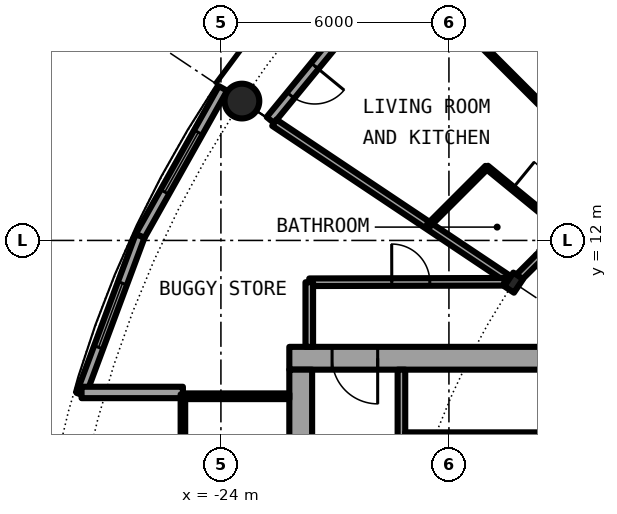
"""IFC4 building model, lengths in metres.
Left out: names, types, materials, properties, quantities, classifications, styles, units other than length and angle.
Written with IfcOpenShell. Run it as: python <this file> out.ifc"""

import sys

from ifc_helpers import new_model, si_unit, direction, frame, frame_2d, origin, origin_2d, place, context, subcontext, project, spatial, rectangle, hollow_circle, i_section, extrude, element, fill, save


model = new_model("IFC4")
c1 = context("Model", 3, precision=1e-05, world=origin(), true_north=direction((0.0, 1.0)))
c2 = subcontext(c1, "Body", "Model", "MODEL_VIEW")
j1 = project(units=[si_unit("LENGTHUNIT", "METRE"), si_unit("PLANEANGLEUNIT", "RADIAN")], contexts=[c1])
p1 = place(None, origin())
s1 = spatial("IfcSite", under=j1, at=p1, CompositionType="ELEMENT")
p2 = place(p1, origin())
s2 = spatial("IfcBuilding", under=s1, at=p2, CompositionType="ELEMENT")
p3 = place(p2, frame((0.0, 0.0, 111.65)))
s3 = spatial("IfcBuildingStorey", under=s2, at=p3, CompositionType="ELEMENT", Elevation=111.65)
p4 = place(p3, frame((-23.448, 15.667, 0.0), z_axis=(0.0, 0.0, 1.0), x_axis=(1.0, 0.0, 0.0)))
e1 = element("IfcColumn", 1, at=p4, inside=s3, PredefinedType="COLUMN", context=c2, shape_type="SweptSolid", body=[
    extrude(hollow_circle(Radius=0.457, WallThickness=0.04, at=origin_2d()), origin(), (0.0, 0.0, 1.0), 3.05),
])
p5 = place(p3, frame((-16.297, 10.889, 0.0), z_axis=(0.0, 0.0, 1.0), x_axis=(-0.831469612303, 0.55557023302, 0.0)))
e2 = element("IfcColumn", 2, at=p5, inside=s3, PredefinedType="COLUMN", context=c2, shape_type="SweptSolid", body=[
    extrude(i_section(OverallWidth=0.307, OverallDepth=0.432, WebThickness=0.021, FlangeThickness=0.04, FilletRadius=0.027, at=origin_2d()), origin(), (0.0, 0.0, 1.0), 3.05),
])
p6 = place(p3, frame((-19.304, 19.304, 0.0), z_axis=(0.0, 0.0, 1.0), x_axis=(-0.634382322723, -0.773019449054, 0.0)))
e3 = element("IfcWall", 3, at=p6, inside=s3, PredefinedType="SOLIDWALL", context=c2, shape_type="SweptSolid", body=[
    extrude(rectangle(XDim=5.352, YDim=0.25, at=frame_2d((2.676, 0.0))), origin(), (0.0, 0.0, 1.0), 2.7),
])
p7 = place(p6, frame((0.441, 0.0, 0.3)))
e4 = element("IfcOpeningElement", 4, at=p7, cuts=e3, PredefinedType="OPENING", context=c2, shape_type="SweptSolid", body=[
    extrude(rectangle(XDim=1.8, YDim=2.1, at=frame_2d((0.9, 1.05))), frame((0.0, 0.135, 0.0), z_axis=(0.0, -1.0, 0.0), x_axis=(1.0, 0.0, 0.0)), (0.0, 0.0, 1.0), 0.27),
])
p8 = place(p6, frame((3.51, 0.0, 0.0)))
e5 = element("IfcOpeningElement", 5, at=p8, cuts=e3, PredefinedType="OPENING", context=c2, shape_type="SweptSolid", body=[
    extrude(rectangle(XDim=1.0, YDim=2.2, at=frame_2d((0.5, 1.1))), frame((0.0, 0.135, 0.0), z_axis=(0.0, -1.0, 0.0), x_axis=(1.0, 0.0, 0.0)), (0.0, 0.0, 1.0), 0.27),
])
p9 = place(p3, frame((-23.946, 16.0, 0.0), z_axis=(0.0, 0.0, 1.0), x_axis=(-0.489696356642, -0.871893042919, 0.0)))
e6 = element("IfcWall", 6, at=p9, inside=s3, PredefinedType="SOLIDWALL", context=c2, shape_type="SweptSolid", body=[
    extrude(rectangle(XDim=4.454, YDim=0.25, at=frame_2d((2.227, 0.0))), origin(), (0.0, 0.0, 1.0), 2.7),
])
p10 = place(p9, frame((1.327, 0.0, 0.3)))
e7 = element("IfcOpeningElement", 7, at=p10, cuts=e6, PredefinedType="OPENING", context=c2, shape_type="SweptSolid", body=[
    extrude(rectangle(XDim=1.8, YDim=2.1, at=frame_2d((0.9, 1.05))), frame((0.0, 0.135, 0.0), z_axis=(0.0, -1.0, 0.0), x_axis=(1.0, 0.0, 0.0)), (0.0, 0.0, 1.0), 0.27),
])
p11 = place(p3, frame((-26.127, 12.117, 0.0), z_axis=(0.0, 0.0, 1.0), x_axis=(-0.349247811493, -0.937030397675, 0.0)))
e8 = element("IfcWall", 8, at=p11, inside=s3, PredefinedType="SOLIDWALL", context=c2, shape_type="SweptSolid", body=[
    extrude(rectangle(XDim=4.452, YDim=0.25, at=frame_2d((2.226, 0.0))), origin(), (0.0, 0.0, 1.0), 2.7),
])
p12 = place(p11, frame((1.327, 0.0, 0.3)))
e9 = element("IfcOpeningElement", 9, at=p12, cuts=e8, PredefinedType="OPENING", context=c2, shape_type="SweptSolid", body=[
    extrude(rectangle(XDim=1.8, YDim=2.1, at=frame_2d((0.9, 1.05))), frame((0.0, 0.135, 0.0), z_axis=(0.0, -1.0, 0.0), x_axis=(1.0, 0.0, 0.0)), (0.0, 0.0, 1.0), 0.27),
])
p13 = place(p3, frame((-25.0, 8.0, 0.0), z_axis=(0.0, 0.0, 1.0), x_axis=(-1.0, 0.0, 0.0)))
e10 = element("IfcWall", 10, at=p13, inside=s3, PredefinedType="SOLIDWALL", context=c2, shape_type="SweptSolid", body=[
    extrude(rectangle(XDim=2.667, YDim=0.3, at=frame_2d((1.333, 0.0))), origin(), (0.0, 0.0, 1.0), 2.7),
])
p14 = place(p3, frame((-8.4, 8.9, 0.0), z_axis=(0.0, 0.0, 1.0), x_axis=(-1.0, 0.0, 0.0)))
e11 = element("IfcWall", 11, at=p14, inside=s3, PredefinedType="SHEAR", context=c2, shape_type="SweptSolid", body=[
    extrude(rectangle(XDim=13.8, YDim=0.6, at=frame_2d((6.9, 0.0))), origin(), (0.0, 0.0, 1.0), 3.05),
])
p15 = place(p14, frame((11.475, 0.0, 0.0)))
e12 = element("IfcOpeningElement", 12, at=p15, cuts=e11, PredefinedType="OPENING", context=c2, shape_type="SweptSolid", body=[
    extrude(rectangle(XDim=1.2, YDim=2.3, at=frame_2d((0.6, 1.15))), frame((0.0, 0.31, 0.0), z_axis=(0.0, -1.0, 0.0), x_axis=(1.0, 0.0, 0.0)), (0.0, 0.0, 1.0), 0.62),
])
p16 = place(p3, frame((-21.9, -8.6, 0.0), z_axis=(0.0, 0.0, 1.0), x_axis=(0.0, 1.0, 0.0)))
e13 = element("IfcWall", 13, at=p16, inside=s3, PredefinedType="SHEAR", context=c2, shape_type="SweptSolid", body=[
    extrude(rectangle(XDim=17.2, YDim=0.6, at=frame_2d((8.6, 0.0))), origin(), (0.0, 0.0, 1.0), 3.05),
])
p17 = place(p16, frame((7.7, 0.0, 0.0)))
e14 = element("IfcOpeningElement", 14, at=p17, cuts=e13, PredefinedType="OPENING", context=c2, shape_type="SweptSolid", body=[
    extrude(rectangle(XDim=1.8, YDim=2.3, at=frame_2d((0.9, 1.15))), frame((0.0, 0.31, 0.0), z_axis=(0.0, -1.0, 0.0), x_axis=(1.0, 0.0, 0.0)), (0.0, 0.0, 1.0), 0.62),
])
p18 = place(p3, frame((-19.25, 8.6, 0.0), z_axis=(0.0, 0.0, 1.0), x_axis=(0.0, -1.0, 0.0)))
e15 = element("IfcWall", 15, at=p18, inside=s3, PredefinedType="SOLIDWALL", context=c2, shape_type="SweptSolid", body=[
    extrude(rectangle(XDim=7.025, YDim=0.2, at=frame_2d((3.513, 0.0))), origin(), (0.0, 0.0, 1.0), 2.7),
])
p19 = place(p18, frame((2.35, 0.0, 0.0)))
e16 = element("IfcOpeningElement", 16, at=p19, cuts=e15, PredefinedType="OPENING", context=c2, shape_type="SweptSolid", body=[
    extrude(rectangle(XDim=1.1, YDim=2.3, at=frame_2d((0.55, 1.15))), frame((0.0, 0.11, 0.0), z_axis=(0.0, -1.0, 0.0), x_axis=(1.0, 0.0, 0.0)), (0.0, 0.0, 1.0), 0.22),
])
p20 = place(p3, frame((-15.45, 6.875, 0.0), z_axis=(0.0, 0.0, 1.0), x_axis=(-1.0, 0.0, 0.0)))
e17 = element("IfcWall", 17, at=p20, inside=s3, PredefinedType="PARTITIONING", context=c2, shape_type="SweptSolid", body=[
    extrude(rectangle(XDim=3.7, YDim=0.15, at=frame_2d((1.85, 0.0))), origin(), (0.0, 0.0, 1.0), 2.7),
])
p21 = place(p20, frame((1.4, 0.0, 0.0)))
e18 = element("IfcOpeningElement", 18, at=p21, cuts=e17, PredefinedType="OPENING", context=c2, shape_type="SweptSolid", body=[
    extrude(rectangle(XDim=0.9, YDim=2.3, at=frame_2d((0.45, 1.15))), frame((0.0, 0.085, 0.0), z_axis=(0.0, -1.0, 0.0), x_axis=(1.0, 0.0, 0.0)), (0.0, 0.0, 1.0), 0.17),
])
p22 = place(p3, frame((-22.2, 7.9, 0.0), z_axis=(0.0, 0.0, 1.0), x_axis=(-1.0, 0.0, 0.0)))
e19 = element("IfcWall", 19, at=p22, inside=s3, PredefinedType="PARTITIONING", context=c2, shape_type="SweptSolid", body=[
    extrude(rectangle(XDim=2.74, YDim=0.15, at=frame_2d((1.37, 0.0))), origin(), (0.0, 0.0, 1.0), 2.7),
])
p23 = place(p3, frame((-25.0, 7.95, 0.0), z_axis=(0.0, 0.0, 1.0), x_axis=(0.0, -1.0, 0.0)))
e20 = element("IfcWall", 20, at=p23, inside=s3, PredefinedType="PARTITIONING", context=c2, shape_type="SweptSolid", body=[
    extrude(rectangle(XDim=15.9, YDim=0.12, at=frame_2d((7.95, 0.0))), origin(), (0.0, 0.0, 1.0), 2.7),
])
p24 = place(p23, frame((0.95, 0.0, 0.1)))
e21 = element("IfcOpeningElement", 21, at=p24, cuts=e20, PredefinedType="OPENING", context=c2, shape_type="SweptSolid", body=[
    extrude(rectangle(XDim=14.0, YDim=2.35, at=frame_2d((7.0, 1.175))), frame((0.0, 0.07, 0.0), z_axis=(0.0, -1.0, 0.0), x_axis=(1.0, 0.0, 0.0)), (0.0, 0.0, 1.0), 0.14),
])
p25 = place(p3, frame((-22.595, 15.098, 0.0), z_axis=(0.0, 0.0, 1.0), x_axis=(0.831406593008, -0.555664536482, 0.0)))
e22 = element("IfcWall", 22, at=p25, inside=s3, PredefinedType="PARTITIONING", context=c2, shape_type="SweptSolid", body=[
    extrude(rectangle(XDim=7.358, YDim=0.2, at=frame_2d((3.679, 0.0))), origin(), (0.0, 0.0, 1.0), 2.7),
])
p26 = place(p3, frame((-19.216, 19.216, 0.0), z_axis=(0.0, 0.0, 1.0), x_axis=(0.707106781187, -0.707106781187, 0.0)))
e23 = element("IfcWall", 23, at=p26, inside=s3, PredefinedType="PARTITIONING", context=c2, shape_type="SweptSolid", body=[
    extrude(rectangle(XDim=5.305, YDim=0.1, at=frame_2d((2.652, 0.0))), origin(), (0.0, 0.0, 1.0), 2.7),
])
p27 = place(p26, frame((2.202, 0.0, 0.0)))
e24 = element("IfcOpeningElement", 24, at=p27, cuts=e23, PredefinedType="OPENING", context=c2, shape_type="SweptSolid", body=[
    extrude(rectangle(XDim=0.9, YDim=2.3, at=frame_2d((0.45, 1.15))), frame((0.0, 0.06, 0.0), z_axis=(0.0, -1.0, 0.0), x_axis=(1.0, 0.0, 0.0)), (0.0, 0.0, 1.0), 0.12),
])
p28 = place(p3, frame((-17.004, 13.927, 0.0), z_axis=(0.0, 0.0, 1.0), x_axis=(0.77367517848, -0.633582447834, 0.0)))
e25 = element("IfcWall", 25, at=p28, inside=s3, PredefinedType="PARTITIONING", context=c2, shape_type="SweptSolid", body=[
    extrude(rectangle(XDim=2.661, YDim=0.1, at=frame_2d((1.331, 0.0))), origin(), (0.0, 0.0, 1.0), 2.7),
])
p29 = place(p28, frame((0.881, 0.0, 0.0)))
e26 = element("IfcOpeningElement", 26, at=p29, cuts=e25, PredefinedType="OPENING", context=c2, shape_type="SweptSolid", body=[
    extrude(rectangle(XDim=0.9, YDim=2.3, at=frame_2d((0.45, 1.15))), frame((0.0, 0.06, 0.0), z_axis=(0.0, -1.0, 0.0), x_axis=(1.0, 0.0, 0.0)), (0.0, 0.0, 1.0), 0.12),
])
p30 = place(p3, frame((-21.675, 10.9, 0.0), z_axis=(0.0, 0.0, 1.0), x_axis=(0.999997173357, 0.002377662213, 0.0)))
e27 = element("IfcWall", 27, at=p30, inside=s3, PredefinedType="PARTITIONING", context=c2, shape_type="SweptSolid", body=[
    extrude(rectangle(XDim=5.134, YDim=0.2, at=frame_2d((2.567, 0.0))), origin(), (0.0, 0.0, 1.0), 2.7),
])
p31 = place(p30, frame((2.171, 0.0, 0.0)))
e28 = element("IfcOpeningElement", 28, at=p31, cuts=e27, PredefinedType="OPENING", context=c2, shape_type="SweptSolid", body=[
    extrude(rectangle(XDim=1.0, YDim=2.3, at=frame_2d((0.5, 1.15))), frame((0.0, 0.11, 0.0), z_axis=(0.0, -1.0, 0.0), x_axis=(1.0, 0.0, 0.0)), (0.0, 0.0, 1.0), 0.22),
])
p32 = place(p3, frame((-16.186, 11.0, 0.0), z_axis=(0.0, 0.0, 1.0), x_axis=(0.707106781187, 0.707106781187, 0.0)))
e29 = element("IfcWall", 29, at=p32, inside=s3, PredefinedType="PARTITIONING", context=c2, shape_type="SweptSolid", body=[
    extrude(rectangle(XDim=7.334, YDim=0.2, at=frame_2d((3.667, 0.0))), origin(), (0.0, 0.0, 1.0), 2.39),
])
p33 = place(p32, frame((4.123, 0.0, 0.0)))
e30 = element("IfcOpeningElement", 30, at=p33, cuts=e29, PredefinedType="OPENING", context=c2, shape_type="SweptSolid", body=[
    extrude(rectangle(XDim=1.0, YDim=2.3, at=frame_2d((0.5, 1.15))), frame((0.0, 0.11, 0.0), z_axis=(0.0, -1.0, 0.0), x_axis=(1.0, 0.0, 0.0)), (0.0, 0.0, 1.0), 0.22),
])
p34 = place(p3, frame((-21.675, 9.2, 0.0), z_axis=(0.0, 0.0, 1.0), x_axis=(0.0, 1.0, 0.0)))
e31 = element("IfcWall", 31, at=p34, inside=s3, PredefinedType="PARTITIONING", context=c2, shape_type="SweptSolid", body=[
    extrude(rectangle(XDim=1.7, YDim=0.2, at=frame_2d((0.85, 0.0))), origin(), (0.0, 0.0, 1.0), 2.7),
])
p35 = place(p3, frame((-18.542, 12.389, 0.0), z_axis=(0.0, 0.0, 1.0), x_axis=(0.707106781187, 0.707106781187, 0.0)))
e32 = element("IfcWall", 32, at=p35, inside=s3, PredefinedType="PARTITIONING", context=c2, shape_type="SweptSolid", body=[
    extrude(rectangle(XDim=2.175, YDim=0.1, at=frame_2d((1.088, 0.0))), origin(), (0.0, 0.0, 1.0), 2.7),
])
p36 = place(p8, origin())
e33 = element("IfcDoor", 33, at=p36, inside=s3, OperationType="SINGLE_SWING_LEFT", PredefinedType="DOOR", context=c2, shape_type="SweptSolid", body=[
    extrude(rectangle(XDim=1.0, YDim=2.2, at=frame_2d((0.5, 1.1))), frame((0.0, 0.025, 0.0), z_axis=(0.0, -1.0, 0.0), x_axis=(1.0, 0.0, 0.0)), (0.0, 0.0, 1.0), 0.05),
])
fill(e5, e33)
p37 = place(p10, origin())
e34 = element("IfcWindow", 34, at=p37, inside=s3, PartitioningType="SINGLE_PANEL", PredefinedType="WINDOW", context=c2, shape_type="SweptSolid", body=[
    extrude(rectangle(XDim=1.8, YDim=2.1, at=frame_2d((0.9, 1.05))), frame((0.0, 0.03, 0.0), z_axis=(0.0, -1.0, 0.0), x_axis=(1.0, 0.0, 0.0)), (0.0, 0.0, 1.0), 0.06),
])
fill(e7, e34)
p38 = place(p12, origin())
e35 = element("IfcWindow", 35, at=p38, inside=s3, PartitioningType="SINGLE_PANEL", PredefinedType="WINDOW", context=c2, shape_type="SweptSolid", body=[
    extrude(rectangle(XDim=1.8, YDim=2.1, at=frame_2d((0.9, 1.05))), frame((0.0, 0.03, 0.0), z_axis=(0.0, -1.0, 0.0), x_axis=(1.0, 0.0, 0.0)), (0.0, 0.0, 1.0), 0.06),
])
fill(e9, e35)
p39 = place(p21, origin())
e36 = element("IfcDoor", 36, at=p39, inside=s3, OperationType="SINGLE_SWING_LEFT", PredefinedType="DOOR", context=c2, shape_type="SweptSolid", body=[
    extrude(rectangle(XDim=0.9, YDim=2.3, at=frame_2d((0.45, 1.15))), frame((0.0, 0.025, 0.0), z_axis=(0.0, -1.0, 0.0), x_axis=(1.0, 0.0, 0.0)), (0.0, 0.0, 1.0), 0.05),
])
fill(e18, e36)
p40 = place(p15, origin())
e37 = element("IfcDoor", 37, at=p40, inside=s3, OperationType="SINGLE_SWING_LEFT", PredefinedType="DOOR", context=c2, shape_type="SweptSolid", body=[
    extrude(rectangle(XDim=1.2, YDim=2.3, at=frame_2d((0.6, 1.15))), frame((0.0, 0.025, 0.0), z_axis=(0.0, -1.0, 0.0), x_axis=(1.0, 0.0, 0.0)), (0.0, 0.0, 1.0), 0.05),
])
fill(e12, e37)
p41 = place(p24, origin())
e38 = element("IfcWindow", 38, at=p41, inside=s3, PartitioningType="SINGLE_PANEL", PredefinedType="WINDOW", context=c2, shape_type="SweptSolid", body=[
    extrude(rectangle(XDim=14.0, YDim=2.35, at=frame_2d((7.0, 1.175))), frame((0.0, 0.03, 0.0), z_axis=(0.0, -1.0, 0.0), x_axis=(1.0, 0.0, 0.0)), (0.0, 0.0, 1.0), 0.06),
])
fill(e21, e38)
p42 = place(p29, origin())
e39 = element("IfcDoor", 39, at=p42, inside=s3, OperationType="SINGLE_SWING_RIGHT", PredefinedType="DOOR", context=c2, shape_type="SweptSolid", body=[
    extrude(rectangle(XDim=0.9, YDim=2.3, at=frame_2d((0.45, 1.15))), frame((0.0, 0.025, 0.0), z_axis=(0.0, -1.0, 0.0), x_axis=(1.0, 0.0, 0.0)), (0.0, 0.0, 1.0), 0.05),
])
fill(e26, e39)
p43 = place(p31, origin())
e40 = element("IfcDoor", 40, at=p43, inside=s3, OperationType="SINGLE_SWING_RIGHT", PredefinedType="DOOR", context=c2, shape_type="SweptSolid", body=[
    extrude(rectangle(XDim=1.0, YDim=2.3, at=frame_2d((0.5, 1.15))), frame((0.0, 0.025, 0.0), z_axis=(0.0, -1.0, 0.0), x_axis=(1.0, 0.0, 0.0)), (0.0, 0.0, 1.0), 0.05),
])
fill(e28, e40)
save(model, sys.argv[1])
